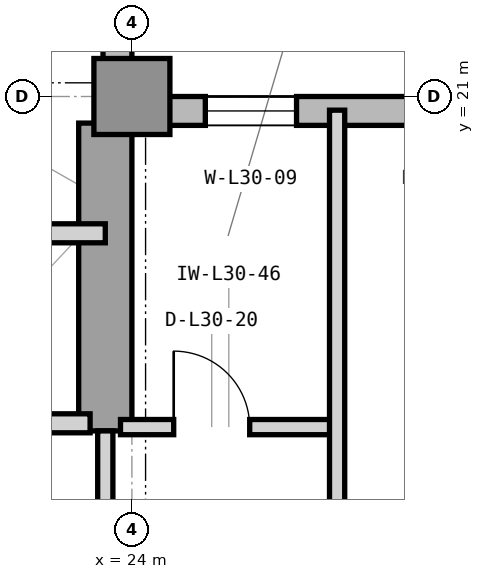
"""IFC4 building model, lengths in metres.
Left out: names, types, materials, properties, quantities, classifications, styles, units other than length and angle.
Written with IfcOpenShell. Run it as: python <this file> out.ifc"""

import sys

from ifc_helpers import new_model, si_unit, direction, frame, frame_2d, origin, origin_2d, place, context, subcontext, project, spatial, rectangle, extrude, element, fill, save


model = new_model("IFC4")
c1 = context("Model", 3, precision=1e-05, world=origin(), true_north=direction((0.0, 1.0)))
c2 = subcontext(c1, "Body", "Model", "MODEL_VIEW")
j1 = project(units=[si_unit("LENGTHUNIT", "METRE"), si_unit("PLANEANGLEUNIT", "RADIAN")], contexts=[c1])
p1 = place(None, origin())
s1 = spatial("IfcSite", under=j1, at=p1, CompositionType="ELEMENT")
p2 = place(p1, origin())
s2 = spatial("IfcBuilding", under=s1, at=p2, CompositionType="ELEMENT")
p3 = place(p2, frame((0.0, 0.0, 128.4)))
s3 = spatial("IfcBuildingStorey", under=s2, at=p3, CompositionType="ELEMENT", Elevation=128.4)
p4 = place(p3, frame((23.65, 16.6, 0.0), z_axis=(0.0, 0.0, 1.0), x_axis=(0.0, 1.0, 0.0)))
e1 = element("IfcWall", 1, at=p4, inside=s3, PredefinedType="SHEAR", context=c2, shape_type="SweptSolid", body=[
    extrude(rectangle(XDim=4.05, YDim=0.7, at=frame_2d((2.025, 0.0))), origin(), (0.0, 0.0, 1.0), 3.9),
])
p5 = place(p3, frame((24.0, 21.0, 0.0), z_axis=(0.0, 0.0, 1.0), x_axis=(1.0, 0.0, 0.0)))
e2 = element("IfcColumn", 2, at=p5, inside=s3, PredefinedType="COLUMN", context=c2, shape_type="SweptSolid", body=[
    extrude(rectangle(XDim=1.0, YDim=1.0, at=origin_2d()), origin(), (0.0, 0.0, 1.0), 3.9),
])
p6 = place(p3, frame((41.55, 20.81, 0.0), z_axis=(0.0, 0.0, 1.0), x_axis=(-1.0, 0.0, 0.0)))
e3 = element("IfcWall", 3, at=p6, inside=s3, PredefinedType="STANDARD", context=c2, shape_type="SweptSolid", body=[
    extrude(rectangle(XDim=17.55, YDim=0.38, at=frame_2d((8.775, 0.0))), origin(), (0.0, 0.0, 1.0), 3.7),
])
p7 = place(p6, frame((2.025, 0.0, 0.85)))
e4 = element("IfcOpeningElement", 4, at=p7, cuts=e3, PredefinedType="OPENING", context=c2, shape_type="SweptSolid", body=[
    extrude(rectangle(XDim=1.8, YDim=2.25, at=frame_2d((0.9, 1.125))), frame((0.0, 0.2, 0.0), z_axis=(0.0, -1.0, 0.0), x_axis=(1.0, 0.0, 0.0)), (0.0, 0.0, 1.0), 0.4),
])
p8 = place(p6, frame((15.384, 0.0, 0.85)))
e5 = element("IfcOpeningElement", 5, at=p8, cuts=e3, PredefinedType="OPENING", context=c2, shape_type="SweptSolid", body=[
    extrude(rectangle(XDim=1.2, YDim=2.25, at=frame_2d((0.6, 1.125))), frame((0.0, 0.2, 0.0), z_axis=(0.0, -1.0, 0.0), x_axis=(1.0, 0.0, 0.0)), (0.0, 0.0, 1.0), 0.4),
])
p9 = place(p6, frame((9.854, 0.0, 0.85)))
e6 = element("IfcOpeningElement", 6, at=p9, cuts=e3, PredefinedType="OPENING", context=c2, shape_type="SweptSolid", body=[
    extrude(rectangle(XDim=2.5, YDim=2.25, at=frame_2d((1.25, 1.125))), frame((0.0, 0.2, 0.0), z_axis=(0.0, -1.0, 0.0), x_axis=(1.0, 0.0, 0.0)), (0.0, 0.0, 1.0), 0.4),
])
p10 = place(p3, frame((23.81, 21.0, 0.0), z_axis=(0.0, 0.0, 1.0), x_axis=(0.0, 1.0, 0.0)))
e7 = element("IfcWall", 7, at=p10, inside=s3, PredefinedType="STANDARD", context=c2, shape_type="SweptSolid", body=[
    extrude(rectangle(XDim=25.4, YDim=0.38, at=frame_2d((12.7, 0.0))), origin(), (0.0, 0.0, 1.0), 3.7),
])
p11 = place(p10, frame((11.45, 0.0, 0.85)))
e8 = element("IfcOpeningElement", 8, at=p11, cuts=e7, PredefinedType="OPENING", context=c2, shape_type="SweptSolid", body=[
    extrude(rectangle(XDim=2.5, YDim=2.25, at=frame_2d((1.25, 1.125))), frame((0.0, 0.2, 0.0), z_axis=(0.0, -1.0, 0.0), x_axis=(1.0, 0.0, 0.0)), (0.0, 0.0, 1.0), 0.4),
])
p12 = place(p10, frame((15.974, 0.0, 0.85)))
e9 = element("IfcOpeningElement", 9, at=p12, cuts=e7, PredefinedType="OPENING", context=c2, shape_type="SweptSolid", body=[
    extrude(rectangle(XDim=1.2, YDim=2.25, at=frame_2d((0.6, 1.125))), frame((0.0, 0.2, 0.0), z_axis=(0.0, -1.0, 0.0), x_axis=(1.0, 0.0, 0.0)), (0.0, 0.0, 1.0), 0.4),
])
p13 = place(p3, frame((21.05, 16.7, 0.0), z_axis=(0.0, 0.0, 1.0), x_axis=(1.0, 0.0, 0.0)))
e10 = element("IfcWall", 10, at=p13, inside=s3, PredefinedType="PARTITIONING", context=c2, shape_type="SweptSolid", body=[
    extrude(rectangle(XDim=2.4, YDim=0.25, at=frame_2d((1.2, 0.0))), origin(), (0.0, 0.0, 1.0), 3.233),
])
p14 = place(p3, frame((16.45, 19.2, 0.0), z_axis=(0.0, 0.0, 1.0), x_axis=(1.0, 0.0, 0.0)))
e11 = element("IfcWall", 11, at=p14, inside=s3, PredefinedType="PARTITIONING", context=c2, shape_type="SweptSolid", body=[
    extrude(rectangle(XDim=7.2, YDim=0.25, at=frame_2d((3.6, 0.0))), origin(), (0.0, 0.0, 1.0), 3.69),
])
p15 = place(p3, frame((23.65, 13.6, 0.0), z_axis=(0.0, 0.0, 1.0), x_axis=(0.0, 1.0, 0.0)))
e12 = element("IfcWall", 12, at=p15, inside=s3, PredefinedType="PARTITIONING", context=c2, shape_type="SweptSolid", body=[
    extrude(rectangle(XDim=3.0, YDim=0.2, at=frame_2d((1.5, 0.0))), origin(), (0.0, 0.0, 1.0), 3.69),
])
p16 = place(p3, frame((23.85, 16.65, 0.0), z_axis=(0.0, 0.0, 1.0), x_axis=(1.0, 0.0, 0.0)))
e13 = element("IfcWall", 13, at=p16, inside=s3, PredefinedType="PARTITIONING", context=c2, shape_type="SweptSolid", body=[
    extrude(rectangle(XDim=2.85, YDim=0.2, at=frame_2d((1.425, 0.0))), origin(), (0.0, 0.0, 1.0), 3.69),
])
p17 = place(p16, frame((0.7, 0.0, 0.0)))
e14 = element("IfcOpeningElement", 14, at=p17, cuts=e13, PredefinedType="OPENING", context=c2, shape_type="SweptSolid", body=[
    extrude(rectangle(XDim=1.0, YDim=2.15, at=frame_2d((0.5, 1.075))), frame((0.0, 0.11, 0.0), z_axis=(0.0, -1.0, 0.0), x_axis=(1.0, 0.0, 0.0)), (0.0, 0.0, 1.0), 0.22),
])
p18 = place(p3, frame((26.7, 11.45, 0.0), z_axis=(0.0, 0.0, 1.0), x_axis=(0.0, 1.0, 0.0)))
e15 = element("IfcWall", 15, at=p18, inside=s3, PredefinedType="PARTITIONING", context=c2, shape_type="SweptSolid", body=[
    extrude(rectangle(XDim=9.37, YDim=0.2, at=frame_2d((4.685, 0.0))), origin(), (0.0, 0.0, 1.0), 3.69),
])
p19 = place(p17, origin())
e16 = element("IfcDoor", 16, at=p19, inside=s3, OperationType="SINGLE_SWING_LEFT", PredefinedType="DOOR", context=c2, shape_type="SweptSolid", body=[
    extrude(rectangle(XDim=1.0, YDim=2.15, at=frame_2d((0.5, 1.075))), frame((0.0, 0.025, 0.0), z_axis=(0.0, -1.0, 0.0), x_axis=(1.0, 0.0, 0.0)), (0.0, 0.0, 1.0), 0.05),
])
fill(e14, e16)
p20 = place(p8, origin())
e17 = element("IfcWindow", 17, at=p20, inside=s3, PartitioningType="SINGLE_PANEL", PredefinedType="WINDOW", context=c2, shape_type="SweptSolid", body=[
    extrude(rectangle(XDim=1.2, YDim=2.25, at=frame_2d((0.6, 1.125))), frame((0.0, 0.11, 0.0), z_axis=(0.0, -1.0, 0.0), x_axis=(1.0, 0.0, 0.0)), (0.0, 0.0, 1.0), 0.06),
])
fill(e5, e17)
save(model, sys.argv[1])
